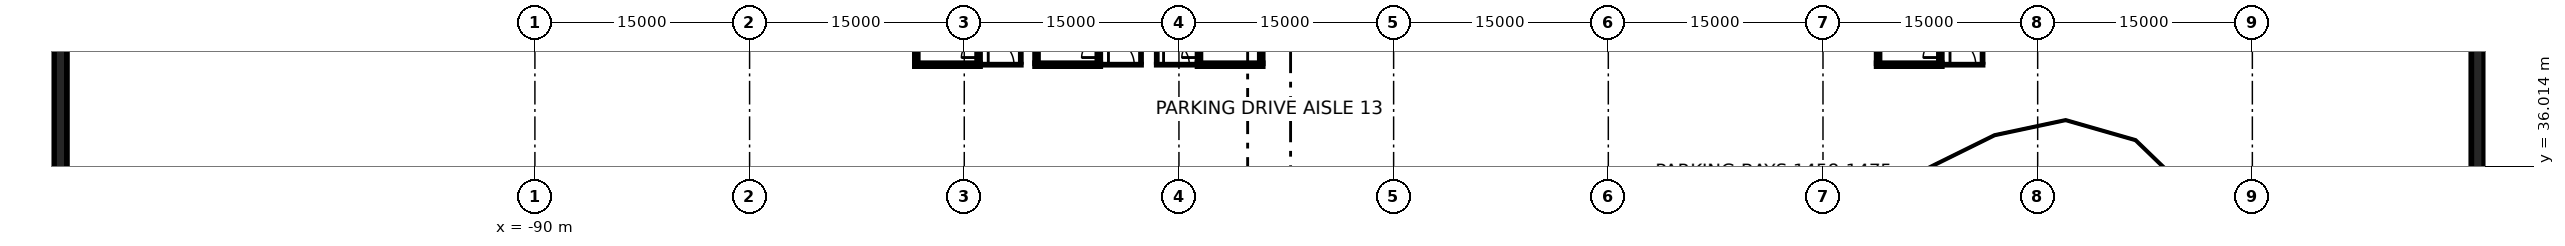
"""IFC4 building model, lengths in metres.
Left out: names, types, materials, properties, quantities, classifications, styles, units other than length and angle.
Written with IfcOpenShell. Run it as: python <this file> out.ifc"""

import sys

from ifc_helpers import new_model, si_unit, direction, frame, frame_2d, origin, place, context, subcontext, project, spatial, rectangle, extrude, element, fill, save


model = new_model("IFC4")
c1 = context("Model", 3, precision=1e-05, world=origin(), true_north=direction((0.0, 1.0)))
c2 = subcontext(c1, "Body", "Model", "MODEL_VIEW")
j1 = project(units=[si_unit("LENGTHUNIT", "METRE"), si_unit("PLANEANGLEUNIT", "RADIAN")], contexts=[c1])
p1 = place(None, origin())
s1 = spatial("IfcSite", under=j1, at=p1, CompositionType="ELEMENT")
p2 = place(p1, origin())
s2 = spatial("IfcBuilding", under=s1, at=p2, CompositionType="ELEMENT")
p3 = place(p2, frame((0.0, 0.0, -12.0)))
s3 = spatial("IfcBuildingStorey", under=s2, at=p3, CompositionType="ELEMENT", Elevation=-12.0)
for number, where, z_axis, x_axis in (
    (1, (-123.15, -80.0, 0.0), (0.0, 0.0, 1.0), (0.0, 1.0, 0.0)),
    (2, (45.75, -80.0, 0.0), (0.0, 0.0, 1.0), (0.0, 1.0, 0.0)),
):
    element("IfcWall", number, at=place(p3, frame(where, z_axis=z_axis, x_axis=x_axis)), inside=s3, PredefinedType="USERDEFINED", context=c2, shape_type="SweptSolid", body=[
        extrude(rectangle(XDim=160.0, YDim=0.9, at=frame_2d((80.0, 0.0))), origin(), (0.0, 0.0, 1.0), 11.55),
    ])
p4 = place(p3, frame((-58.9, 43.1, 0.0), z_axis=(0.0, 0.0, 1.0), x_axis=(1.0, 0.0, 0.0)))
e3 = element("IfcWall", 3, at=p4, inside=s3, PredefinedType="PARTITIONING", context=c2, shape_type="SweptSolid", body=[
    extrude(rectangle(XDim=2.95, YDim=0.2, at=frame_2d((1.475, 0.0))), origin(), (0.0, 0.0, 1.0), 4.4),
])
p5 = place(p4, frame((0.575, 0.0, 0.0)))
e4 = element("IfcOpeningElement", 4, at=p5, cuts=e3, PredefinedType="OPENING", context=c2, shape_type="SweptSolid", body=[
    extrude(rectangle(XDim=1.8, YDim=2.1, at=frame_2d((0.9, 1.05))), frame((0.0, 0.11, 0.0), z_axis=(0.0, -1.0, 0.0), x_axis=(1.0, 0.0, 0.0)), (0.0, 0.0, 1.0), 0.22),
])
p6 = place(p3, frame((-56.05, 43.2, 0.0), z_axis=(0.0, 0.0, 1.0), x_axis=(0.0, 1.0, 0.0)))
e5 = element("IfcWall", 5, at=p6, inside=s3, PredefinedType="PARTITIONING", context=c2, shape_type="SweptSolid", body=[
    extrude(rectangle(XDim=3.6, YDim=0.2, at=frame_2d((1.8, 0.0))), origin(), (0.0, 0.0, 1.0), 4.4),
])
p7 = place(p3, frame((-50.5, 43.1, 0.0), z_axis=(0.0, 0.0, 1.0), x_axis=(1.0, 0.0, 0.0)))
e6 = element("IfcWall", 6, at=p7, inside=s3, PredefinedType="PARTITIONING", context=c2, shape_type="SweptSolid", body=[
    extrude(rectangle(XDim=2.95, YDim=0.2, at=frame_2d((1.475, 0.0))), origin(), (0.0, 0.0, 1.0), 4.4),
])
p8 = place(p7, frame((0.575, 0.0, 0.0)))
e7 = element("IfcOpeningElement", 7, at=p8, cuts=e6, PredefinedType="OPENING", context=c2, shape_type="SweptSolid", body=[
    extrude(rectangle(XDim=1.8, YDim=2.1, at=frame_2d((0.9, 1.05))), frame((0.0, 0.11, 0.0), z_axis=(0.0, -1.0, 0.0), x_axis=(1.0, 0.0, 0.0)), (0.0, 0.0, 1.0), 0.22),
])
p9 = place(p3, frame((-47.65, 43.2, 0.0), z_axis=(0.0, 0.0, 1.0), x_axis=(0.0, 1.0, 0.0)))
e8 = element("IfcWall", 8, at=p9, inside=s3, PredefinedType="PARTITIONING", context=c2, shape_type="SweptSolid", body=[
    extrude(rectangle(XDim=3.6, YDim=0.2, at=frame_2d((1.8, 0.0))), origin(), (0.0, 0.0, 1.0), 4.4),
])
p10 = place(p3, frame((8.3, 43.1, 0.0), z_axis=(0.0, 0.0, 1.0), x_axis=(1.0, 0.0, 0.0)))
e9 = element("IfcWall", 9, at=p10, inside=s3, PredefinedType="PARTITIONING", context=c2, shape_type="SweptSolid", body=[
    extrude(rectangle(XDim=2.95, YDim=0.2, at=frame_2d((1.475, 0.0))), origin(), (0.0, 0.0, 1.0), 4.4),
])
p11 = place(p10, frame((0.575, 0.0, 0.0)))
e10 = element("IfcOpeningElement", 10, at=p11, cuts=e9, PredefinedType="OPENING", context=c2, shape_type="SweptSolid", body=[
    extrude(rectangle(XDim=1.8, YDim=2.1, at=frame_2d((0.9, 1.05))), frame((0.0, 0.11, 0.0), z_axis=(0.0, -1.0, 0.0), x_axis=(1.0, 0.0, 0.0)), (0.0, 0.0, 1.0), 0.22),
])
p12 = place(p3, frame((11.15, 43.2, 0.0), z_axis=(0.0, 0.0, 1.0), x_axis=(0.0, 1.0, 0.0)))
e11 = element("IfcWall", 11, at=p12, inside=s3, PredefinedType="PARTITIONING", context=c2, shape_type="SweptSolid", body=[
    extrude(rectangle(XDim=3.6, YDim=0.2, at=frame_2d((1.8, 0.0))), origin(), (0.0, 0.0, 1.0), 4.4),
])
p13 = place(p3, frame((-46.65, 43.1, 0.0), z_axis=(0.0, 0.0, 1.0), x_axis=(1.0, 0.0, 0.0)))
e12 = element("IfcWall", 12, at=p13, inside=s3, PredefinedType="PARTITIONING", context=c2, shape_type="SweptSolid", body=[
    extrude(rectangle(XDim=2.95, YDim=0.2, at=frame_2d((1.475, 0.0))), origin(), (0.0, 0.0, 1.0), 4.4),
])
p14 = place(p13, frame((0.575, 0.0, 0.0)))
e13 = element("IfcOpeningElement", 13, at=p14, cuts=e12, PredefinedType="OPENING", context=c2, shape_type="SweptSolid", body=[
    extrude(rectangle(XDim=1.8, YDim=2.1, at=frame_2d((0.9, 1.05))), frame((0.0, 0.11, 0.0), z_axis=(0.0, -1.0, 0.0), x_axis=(1.0, 0.0, 0.0)), (0.0, 0.0, 1.0), 0.22),
])
p15 = place(p3, frame((-46.55, 43.2, 0.0), z_axis=(0.0, 0.0, 1.0), x_axis=(0.0, 1.0, 0.0)))
e14 = element("IfcWall", 14, at=p15, inside=s3, PredefinedType="PARTITIONING", context=c2, shape_type="SweptSolid", body=[
    extrude(rectangle(XDim=3.6, YDim=0.2, at=frame_2d((1.8, 0.0))), origin(), (0.0, 0.0, 1.0), 4.4),
])
p16 = place(p3, frame((-63.35, 43.2, 0.0), z_axis=(0.0, 0.0, 1.0), x_axis=(0.0, 1.0, 0.0)))
e15 = element("IfcWall", 15, at=p16, inside=s3, PredefinedType="SOLIDWALL", context=c2, shape_type="SweptSolid", body=[
    extrude(rectangle(XDim=9.6, YDim=0.2, at=frame_2d((4.8, 0.0))), origin(), (0.0, 0.0, 1.0), 4.4),
])
p17 = place(p3, frame((-59.0, 43.2, 0.0), z_axis=(0.0, 0.0, 1.0), x_axis=(0.0, 1.0, 0.0)))
e16 = element("IfcWall", 16, at=p17, inside=s3, PredefinedType="SOLIDWALL", context=c2, shape_type="SweptSolid", body=[
    extrude(rectangle(XDim=9.6, YDim=0.2, at=frame_2d((4.8, 0.0))), origin(), (0.0, 0.0, 1.0), 4.4),
])
p18 = place(p17, frame((0.4, 0.0, 0.0)))
e17 = element("IfcOpeningElement", 17, at=p18, cuts=e16, PredefinedType="OPENING", context=c2, shape_type="SweptSolid", body=[
    extrude(rectangle(XDim=1.2, YDim=2.1, at=frame_2d((0.6, 1.05))), frame((0.0, 0.11, 0.0), z_axis=(0.0, -1.0, 0.0), x_axis=(1.0, 0.0, 0.0)), (0.0, 0.0, 1.0), 0.22),
])
p19 = place(p3, frame((-58.9, 43.1, 0.0), z_axis=(0.0, 0.0, 1.0), x_axis=(-1.0, 0.0, 0.0)))
e18 = element("IfcWall", 18, at=p19, inside=s3, PredefinedType="SOLIDWALL", context=c2, shape_type="SweptSolid", body=[
    extrude(rectangle(XDim=4.55, YDim=0.2, at=frame_2d((2.275, 0.0))), origin(), (0.0, 0.0, 1.0), 4.4),
])
p20 = place(p3, frame((-54.95, 43.2, 0.0), z_axis=(0.0, 0.0, 1.0), x_axis=(0.0, 1.0, 0.0)))
e19 = element("IfcWall", 19, at=p20, inside=s3, PredefinedType="SOLIDWALL", context=c2, shape_type="SweptSolid", body=[
    extrude(rectangle(XDim=9.6, YDim=0.2, at=frame_2d((4.8, 0.0))), origin(), (0.0, 0.0, 1.0), 4.4),
])
p21 = place(p3, frame((-50.6, 43.2, 0.0), z_axis=(0.0, 0.0, 1.0), x_axis=(0.0, 1.0, 0.0)))
e20 = element("IfcWall", 20, at=p21, inside=s3, PredefinedType="SOLIDWALL", context=c2, shape_type="SweptSolid", body=[
    extrude(rectangle(XDim=9.6, YDim=0.2, at=frame_2d((4.8, 0.0))), origin(), (0.0, 0.0, 1.0), 4.4),
])
p22 = place(p21, frame((0.4, 0.0, 0.0)))
e21 = element("IfcOpeningElement", 21, at=p22, cuts=e20, PredefinedType="OPENING", context=c2, shape_type="SweptSolid", body=[
    extrude(rectangle(XDim=1.2, YDim=2.1, at=frame_2d((0.6, 1.05))), frame((0.0, 0.11, 0.0), z_axis=(0.0, -1.0, 0.0), x_axis=(1.0, 0.0, 0.0)), (0.0, 0.0, 1.0), 0.22),
])
p23 = place(p3, frame((-50.5, 43.1, 0.0), z_axis=(0.0, 0.0, 1.0), x_axis=(-1.0, 0.0, 0.0)))
e22 = element("IfcWall", 22, at=p23, inside=s3, PredefinedType="SOLIDWALL", context=c2, shape_type="SweptSolid", body=[
    extrude(rectangle(XDim=4.55, YDim=0.2, at=frame_2d((2.275, 0.0))), origin(), (0.0, 0.0, 1.0), 4.4),
])
p24 = place(p3, frame((3.85, 43.2, 0.0), z_axis=(0.0, 0.0, 1.0), x_axis=(0.0, 1.0, 0.0)))
e23 = element("IfcWall", 23, at=p24, inside=s3, PredefinedType="SOLIDWALL", context=c2, shape_type="SweptSolid", body=[
    extrude(rectangle(XDim=9.6, YDim=0.2, at=frame_2d((4.8, 0.0))), origin(), (0.0, 0.0, 1.0), 4.4),
])
p25 = place(p3, frame((8.2, 43.2, 0.0), z_axis=(0.0, 0.0, 1.0), x_axis=(0.0, 1.0, 0.0)))
e24 = element("IfcWall", 24, at=p25, inside=s3, PredefinedType="SOLIDWALL", context=c2, shape_type="SweptSolid", body=[
    extrude(rectangle(XDim=9.6, YDim=0.2, at=frame_2d((4.8, 0.0))), origin(), (0.0, 0.0, 1.0), 4.4),
])
p26 = place(p25, frame((0.4, 0.0, 0.0)))
e25 = element("IfcOpeningElement", 25, at=p26, cuts=e24, PredefinedType="OPENING", context=c2, shape_type="SweptSolid", body=[
    extrude(rectangle(XDim=1.2, YDim=2.1, at=frame_2d((0.6, 1.05))), frame((0.0, 0.11, 0.0), z_axis=(0.0, -1.0, 0.0), x_axis=(1.0, 0.0, 0.0)), (0.0, 0.0, 1.0), 0.22),
])
p27 = place(p3, frame((8.3, 43.1, 0.0), z_axis=(0.0, 0.0, 1.0), x_axis=(-1.0, 0.0, 0.0)))
e26 = element("IfcWall", 26, at=p27, inside=s3, PredefinedType="SOLIDWALL", context=c2, shape_type="SweptSolid", body=[
    extrude(rectangle(XDim=4.55, YDim=0.2, at=frame_2d((2.275, 0.0))), origin(), (0.0, 0.0, 1.0), 4.4),
])
p28 = place(p3, frame((-43.6, 43.2, 0.0), z_axis=(0.0, 0.0, 1.0), x_axis=(0.0, 1.0, 0.0)))
e27 = element("IfcWall", 27, at=p28, inside=s3, PredefinedType="SOLIDWALL", context=c2, shape_type="SweptSolid", body=[
    extrude(rectangle(XDim=9.6, YDim=0.2, at=frame_2d((4.8, 0.0))), origin(), (0.0, 0.0, 1.0), 4.4),
])
p29 = place(p28, frame((0.4, 0.0, 0.0)))
e28 = element("IfcOpeningElement", 28, at=p29, cuts=e27, PredefinedType="OPENING", context=c2, shape_type="SweptSolid", body=[
    extrude(rectangle(XDim=1.2, YDim=2.1, at=frame_2d((0.6, 1.05))), frame((0.0, 0.11, 0.0), z_axis=(0.0, -1.0, 0.0), x_axis=(1.0, 0.0, 0.0)), (0.0, 0.0, 1.0), 0.22),
])
p30 = place(p3, frame((-39.25, 43.2, 0.0), z_axis=(0.0, 0.0, 1.0), x_axis=(0.0, 1.0, 0.0)))
e29 = element("IfcWall", 29, at=p30, inside=s3, PredefinedType="SOLIDWALL", context=c2, shape_type="SweptSolid", body=[
    extrude(rectangle(XDim=9.6, YDim=0.2, at=frame_2d((4.8, 0.0))), origin(), (0.0, 0.0, 1.0), 4.4),
])
p31 = place(p3, frame((-39.15, 43.1, 0.0), z_axis=(0.0, 0.0, 1.0), x_axis=(-1.0, 0.0, 0.0)))
e30 = element("IfcWall", 30, at=p31, inside=s3, PredefinedType="SOLIDWALL", context=c2, shape_type="SweptSolid", body=[
    extrude(rectangle(XDim=4.55, YDim=0.2, at=frame_2d((2.275, 0.0))), origin(), (0.0, 0.0, 1.0), 4.4),
])
p32 = place(p5, origin())
e31 = element("IfcDoor", 31, at=p32, inside=s3, OperationType="DOUBLE_DOOR_SINGLE_SWING", PredefinedType="DOOR", context=c2, shape_type="SweptSolid", body=[
    extrude(rectangle(XDim=1.8, YDim=2.1, at=frame_2d((0.9, 1.05))), frame((0.0, 0.025, 0.0), z_axis=(0.0, -1.0, 0.0), x_axis=(1.0, 0.0, 0.0)), (0.0, 0.0, 1.0), 0.05),
])
fill(e4, e31)
p33 = place(p8, origin())
e32 = element("IfcDoor", 32, at=p33, inside=s3, OperationType="DOUBLE_DOOR_SINGLE_SWING", PredefinedType="DOOR", context=c2, shape_type="SweptSolid", body=[
    extrude(rectangle(XDim=1.8, YDim=2.1, at=frame_2d((0.9, 1.05))), frame((0.0, 0.025, 0.0), z_axis=(0.0, -1.0, 0.0), x_axis=(1.0, 0.0, 0.0)), (0.0, 0.0, 1.0), 0.05),
])
fill(e7, e32)
p34 = place(p11, origin())
e33 = element("IfcDoor", 33, at=p34, inside=s3, OperationType="DOUBLE_DOOR_SINGLE_SWING", PredefinedType="DOOR", context=c2, shape_type="SweptSolid", body=[
    extrude(rectangle(XDim=1.8, YDim=2.1, at=frame_2d((0.9, 1.05))), frame((0.0, 0.025, 0.0), z_axis=(0.0, -1.0, 0.0), x_axis=(1.0, 0.0, 0.0)), (0.0, 0.0, 1.0), 0.05),
])
fill(e10, e33)
p35 = place(p14, origin())
e34 = element("IfcDoor", 34, at=p35, inside=s3, OperationType="DOUBLE_DOOR_SINGLE_SWING", PredefinedType="DOOR", context=c2, shape_type="SweptSolid", body=[
    extrude(rectangle(XDim=1.8, YDim=2.1, at=frame_2d((0.9, 1.05))), frame((0.0, 0.025, 0.0), z_axis=(0.0, -1.0, 0.0), x_axis=(1.0, 0.0, 0.0)), (0.0, 0.0, 1.0), 0.05),
])
fill(e13, e34)
p36 = place(p18, origin())
e35 = element("IfcDoor", 35, at=p36, inside=s3, OperationType="SINGLE_SWING_LEFT", PredefinedType="DOOR", context=c2, shape_type="SweptSolid", body=[
    extrude(rectangle(XDim=1.2, YDim=2.1, at=frame_2d((0.6, 1.05))), frame((0.0, 0.025, 0.0), z_axis=(0.0, -1.0, 0.0), x_axis=(1.0, 0.0, 0.0)), (0.0, 0.0, 1.0), 0.05),
])
fill(e17, e35)
p37 = place(p22, origin())
e36 = element("IfcDoor", 36, at=p37, inside=s3, OperationType="SINGLE_SWING_LEFT", PredefinedType="DOOR", context=c2, shape_type="SweptSolid", body=[
    extrude(rectangle(XDim=1.2, YDim=2.1, at=frame_2d((0.6, 1.05))), frame((0.0, 0.025, 0.0), z_axis=(0.0, -1.0, 0.0), x_axis=(1.0, 0.0, 0.0)), (0.0, 0.0, 1.0), 0.05),
])
fill(e21, e36)
p38 = place(p26, origin())
e37 = element("IfcDoor", 37, at=p38, inside=s3, OperationType="SINGLE_SWING_LEFT", PredefinedType="DOOR", context=c2, shape_type="SweptSolid", body=[
    extrude(rectangle(XDim=1.2, YDim=2.1, at=frame_2d((0.6, 1.05))), frame((0.0, 0.025, 0.0), z_axis=(0.0, -1.0, 0.0), x_axis=(1.0, 0.0, 0.0)), (0.0, 0.0, 1.0), 0.05),
])
fill(e25, e37)
p39 = place(p29, origin())
e38 = element("IfcDoor", 38, at=p39, inside=s3, OperationType="SINGLE_SWING_LEFT", PredefinedType="DOOR", context=c2, shape_type="SweptSolid", body=[
    extrude(rectangle(XDim=1.2, YDim=2.1, at=frame_2d((0.6, 1.05))), frame((0.0, 0.025, 0.0), z_axis=(0.0, -1.0, 0.0), x_axis=(1.0, 0.0, 0.0)), (0.0, 0.0, 1.0), 0.05),
])
fill(e28, e38)
save(model, sys.argv[1])
